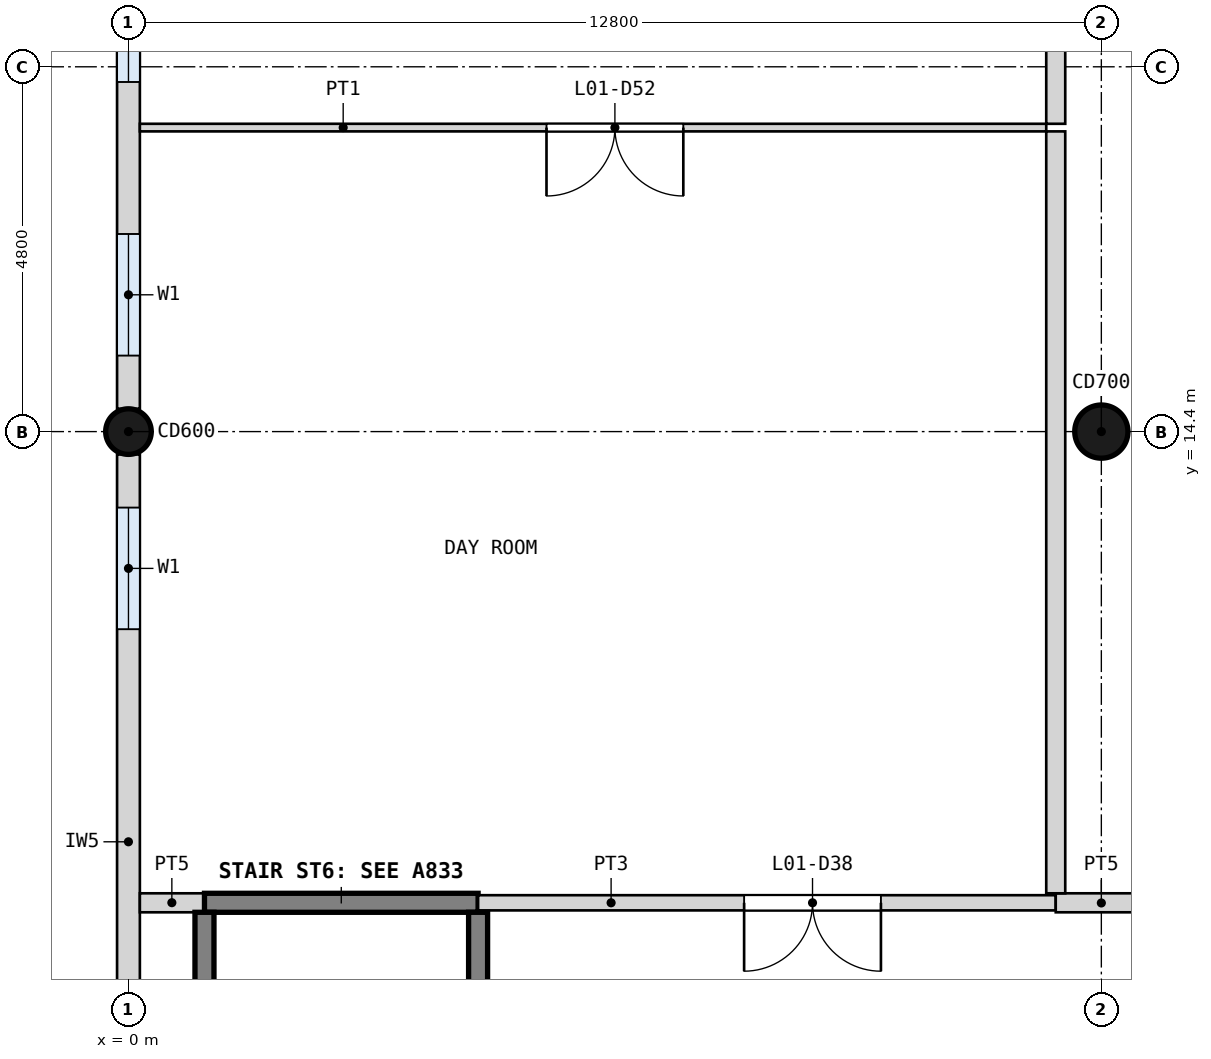
"""IFC4 building model, lengths in metres.
Left out: names, types, materials, properties, quantities, classifications, styles, units other than length and angle.
Written with IfcOpenShell. Run it as: python <this file> out.ifc"""

import sys

from ifc_helpers import new_model, si_unit, direction, frame, frame_2d, origin, origin_2d, place, context, subcontext, project, spatial, rectangle, circle, extrude, element, fill, save


model = new_model("IFC4")
c1 = context("Model", 3, precision=1e-05, world=origin(), true_north=direction((0.0, 1.0)))
c2 = subcontext(c1, "Body", "Model", "MODEL_VIEW")
j1 = project(units=[si_unit("LENGTHUNIT", "METRE"), si_unit("PLANEANGLEUNIT", "RADIAN")], contexts=[c1])
p1 = place(None, origin())
s1 = spatial("IfcSite", under=j1, at=p1, CompositionType="ELEMENT")
p2 = place(p1, origin())
s2 = spatial("IfcBuilding", under=s1, at=p2, CompositionType="ELEMENT")
p3 = place(p2, frame((0.0, 0.0, 4.2)))
s3 = spatial("IfcBuildingStorey", under=s2, at=p3, CompositionType="ELEMENT", Elevation=4.2)
p4 = place(p3, frame((0.0, 14.4, 0.0), z_axis=(0.0, 0.0, 1.0), x_axis=(1.0, 0.0, 0.0)))
e1 = element("IfcColumn", 1, at=p4, inside=s3, PredefinedType="COLUMN", context=c2, shape_type="SweptSolid", body=[
    extrude(circle(Radius=0.3, at=origin_2d()), origin(), (0.0, 0.0, 1.0), 4.2),
])
p5 = place(p3, frame((12.8, 14.4, 0.0), z_axis=(0.0, 0.0, 1.0), x_axis=(1.0, 0.0, 0.0)))
e2 = element("IfcColumn", 2, at=p5, inside=s3, PredefinedType="COLUMN", context=c2, shape_type="SweptSolid", body=[
    extrude(circle(Radius=0.35, at=origin_2d()), origin(), (0.0, 0.0, 1.0), 4.2),
])
p6 = place(p3, frame((0.0, 0.3, 0.0), z_axis=(0.0, 0.0, 1.0), x_axis=(0.0, 1.0, 0.0)))
e3 = element("IfcWall", 3, at=p6, inside=s3, PredefinedType="SOLIDWALL", context=c2, shape_type="SweptSolid", body=[
    extrude(rectangle(XDim=13.8, YDim=0.3, at=frame_2d((6.9, 0.0))), origin(), (0.0, 0.0, 1.0), 2.9),
])
p7 = place(p6, frame((0.7, 0.0, 1.0)))
e4 = element("IfcOpeningElement", 4, at=p7, cuts=e3, PredefinedType="OPENING", context=c2, shape_type="SweptSolid", body=[
    extrude(rectangle(XDim=1.6, YDim=1.8, at=frame_2d((0.8, 0.9))), frame((0.0, 0.16, 0.0), z_axis=(0.0, -1.0, 0.0), x_axis=(1.0, 0.0, 0.0)), (0.0, 0.0, 1.0), 0.32),
])
p8 = place(p6, frame((4.3, 0.0, 1.0)))
e5 = element("IfcOpeningElement", 5, at=p8, cuts=e3, PredefinedType="OPENING", context=c2, shape_type="SweptSolid", body=[
    extrude(rectangle(XDim=1.6, YDim=1.8, at=frame_2d((0.8, 0.9))), frame((0.0, 0.16, 0.0), z_axis=(0.0, -1.0, 0.0), x_axis=(1.0, 0.0, 0.0)), (0.0, 0.0, 1.0), 0.32),
])
p9 = place(p6, frame((11.5, 0.0, 1.0)))
e6 = element("IfcOpeningElement", 6, at=p9, cuts=e3, PredefinedType="OPENING", context=c2, shape_type="SweptSolid", body=[
    extrude(rectangle(XDim=1.6, YDim=1.8, at=frame_2d((0.8, 0.9))), frame((0.0, 0.16, 0.0), z_axis=(0.0, -1.0, 0.0), x_axis=(1.0, 0.0, 0.0)), (0.0, 0.0, 1.0), 0.32),
])
p10 = place(p3, frame((0.0, 14.7, 0.0), z_axis=(0.0, 0.0, 1.0), x_axis=(0.0, 1.0, 0.0)))
e7 = element("IfcWall", 7, at=p10, inside=s3, PredefinedType="SOLIDWALL", context=c2, shape_type="SweptSolid", body=[
    extrude(rectangle(XDim=13.8, YDim=0.3, at=frame_2d((6.9, 0.0))), origin(), (0.0, 0.0, 1.0), 2.9),
])
p11 = place(p10, frame((0.7, 0.0, 1.0)))
e8 = element("IfcOpeningElement", 8, at=p11, cuts=e7, PredefinedType="OPENING", context=c2, shape_type="SweptSolid", body=[
    extrude(rectangle(XDim=1.6, YDim=1.8, at=frame_2d((0.8, 0.9))), frame((0.0, 0.16, 0.0), z_axis=(0.0, -1.0, 0.0), x_axis=(1.0, 0.0, 0.0)), (0.0, 0.0, 1.0), 0.32),
])
p12 = place(p10, frame((4.3, 0.0, 1.0)))
e9 = element("IfcOpeningElement", 9, at=p12, cuts=e7, PredefinedType="OPENING", context=c2, shape_type="SweptSolid", body=[
    extrude(rectangle(XDim=1.6, YDim=1.8, at=frame_2d((0.8, 0.9))), frame((0.0, 0.16, 0.0), z_axis=(0.0, -1.0, 0.0), x_axis=(1.0, 0.0, 0.0)), (0.0, 0.0, 1.0), 0.32),
])
p13 = place(p10, frame((7.9, 0.0, 1.0)))
e10 = element("IfcOpeningElement", 10, at=p13, cuts=e7, PredefinedType="OPENING", context=c2, shape_type="SweptSolid", body=[
    extrude(rectangle(XDim=1.6, YDim=1.8, at=frame_2d((0.8, 0.9))), frame((0.0, 0.16, 0.0), z_axis=(0.0, -1.0, 0.0), x_axis=(1.0, 0.0, 0.0)), (0.0, 0.0, 1.0), 0.32),
])
p14 = place(p10, frame((11.5, 0.0, 1.0)))
e11 = element("IfcOpeningElement", 11, at=p14, cuts=e7, PredefinedType="OPENING", context=c2, shape_type="SweptSolid", body=[
    extrude(rectangle(XDim=1.6, YDim=1.8, at=frame_2d((0.8, 0.9))), frame((0.0, 0.16, 0.0), z_axis=(0.0, -1.0, 0.0), x_axis=(1.0, 0.0, 0.0)), (0.0, 0.0, 1.0), 0.32),
])
p15 = place(p3, frame((0.15, 8.2, 0.0), z_axis=(0.0, 0.0, 1.0), x_axis=(1.0, 0.0, 0.0)))
e12 = element("IfcWall", 12, at=p15, inside=s3, PredefinedType="PARTITIONING", context=c2, shape_type="SweptSolid", body=[
    extrude(rectangle(XDim=0.85, YDim=0.25, at=frame_2d((0.425, 0.0))), origin(), (0.0, 0.0, 1.0), 3.9),
])
p16 = place(p3, frame((1.0, 8.2, 0.0), z_axis=(0.0, 0.0, 1.0), x_axis=(1.0, 0.0, 0.0)))
e13 = element("IfcWall", 13, at=p16, inside=s3, PredefinedType="SHEAR", context=c2, shape_type="SweptSolid", body=[
    extrude(rectangle(XDim=3.6, YDim=0.25, at=frame_2d((1.8, 0.0))), origin(), (0.0, 0.0, 1.0), 3.9),
])
p17 = place(p3, frame((4.6, 8.2, 0.0), z_axis=(0.0, 0.0, 1.0), x_axis=(1.0, 0.0, 0.0)))
e14 = element("IfcWall", 14, at=p17, inside=s3, PredefinedType="PARTITIONING", context=c2, shape_type="SweptSolid", body=[
    extrude(rectangle(XDim=7.6, YDim=0.2, at=frame_2d((3.8, 0.0))), origin(), (0.0, 0.0, 1.0), 3.9),
])
p18 = place(p17, frame((3.5, 0.0, 0.0)))
e15 = element("IfcOpeningElement", 15, at=p18, cuts=e14, PredefinedType="OPENING", context=c2, shape_type="SweptSolid", body=[
    extrude(rectangle(XDim=1.8, YDim=2.1, at=frame_2d((0.9, 1.05))), frame((0.0, 0.11, 0.0), z_axis=(0.0, -1.0, 0.0), x_axis=(1.0, 0.0, 0.0)), (0.0, 0.0, 1.0), 0.22),
])
p19 = place(p3, frame((12.2, 8.2, 0.0), z_axis=(0.0, 0.0, 1.0), x_axis=(1.0, 0.0, 0.0)))
e16 = element("IfcWall", 16, at=p19, inside=s3, PredefinedType="PARTITIONING", context=c2, shape_type="SweptSolid", body=[
    extrude(rectangle(XDim=1.2, YDim=0.25, at=frame_2d((0.6, 0.0))), origin(), (0.0, 0.0, 1.0), 3.9),
])
p20 = place(p3, frame((0.15, 18.4, 0.0), z_axis=(0.0, 0.0, 1.0), x_axis=(1.0, 0.0, 0.0)))
e17 = element("IfcWall", 17, at=p20, inside=s3, PredefinedType="PARTITIONING", context=c2, shape_type="SweptSolid", body=[
    extrude(rectangle(XDim=11.925, YDim=0.1, at=frame_2d((5.962, 0.0))), origin(), (0.0, 0.0, 1.0), 3.9),
])
p21 = place(p20, frame((5.35, 0.0, 0.0)))
e18 = element("IfcOpeningElement", 18, at=p21, cuts=e17, PredefinedType="OPENING", context=c2, shape_type="SweptSolid", body=[
    extrude(rectangle(XDim=1.8, YDim=2.1, at=frame_2d((0.9, 1.05))), frame((0.0, 0.06, 0.0), z_axis=(0.0, -1.0, 0.0), x_axis=(1.0, 0.0, 0.0)), (0.0, 0.0, 1.0), 0.12),
])
p22 = place(p3, frame((1.0, 2.325, 0.0), z_axis=(0.0, 0.0, 1.0), x_axis=(0.0, 1.0, 0.0)))
e19 = element("IfcWall", 19, at=p22, inside=s3, PredefinedType="SHEAR", context=c2, shape_type="SweptSolid", body=[
    extrude(rectangle(XDim=5.75, YDim=0.25, at=frame_2d((2.875, 0.0))), origin(), (0.0, 0.0, 1.0), 3.9),
])
p23 = place(p3, frame((4.6, 5.8, 0.0), z_axis=(0.0, 0.0, 1.0), x_axis=(0.0, 1.0, 0.0)))
e20 = element("IfcWall", 20, at=p23, inside=s3, PredefinedType="SHEAR", context=c2, shape_type="SweptSolid", body=[
    extrude(rectangle(XDim=2.275, YDim=0.25, at=frame_2d((1.137, 0.0))), origin(), (0.0, 0.0, 1.0), 3.9),
])
p24 = place(p3, frame((12.2, 8.325, 0.0), z_axis=(0.0, 0.0, 1.0), x_axis=(0.0, 1.0, 0.0)))
e21 = element("IfcWall", 21, at=p24, inside=s3, PredefinedType="PARTITIONING", context=c2, shape_type="SweptSolid", body=[
    extrude(rectangle(XDim=10.025, YDim=0.25, at=frame_2d((5.013, 0.0))), origin(), (0.0, 0.0, 1.0), 3.9),
])
p25 = place(p3, frame((12.2, 18.45, 0.0), z_axis=(0.0, 0.0, 1.0), x_axis=(0.0, 1.0, 0.0)))
e22 = element("IfcWall", 22, at=p25, inside=s3, PredefinedType="PARTITIONING", context=c2, shape_type="SweptSolid", body=[
    extrude(rectangle(XDim=10.225, YDim=0.25, at=frame_2d((5.113, 0.0))), origin(), (0.0, 0.0, 1.0), 3.9),
])
p26 = place(p18, frame((1.8, 0.0, 0.0), z_axis=(0.0, 0.0, 1.0), x_axis=(-1.0, 0.0, 0.0)))
e23 = element("IfcDoor", 23, at=p26, inside=s3, OperationType="DOUBLE_DOOR_SINGLE_SWING", PredefinedType="DOOR", context=c2, shape_type="SweptSolid", body=[
    extrude(rectangle(XDim=1.8, YDim=2.1, at=frame_2d((0.9, 1.05))), frame((0.0, 0.025, 0.0), z_axis=(0.0, -1.0, 0.0), x_axis=(1.0, 0.0, 0.0)), (0.0, 0.0, 1.0), 0.05),
])
fill(e15, e23)
p27 = place(p21, frame((1.8, 0.0, 0.0), z_axis=(0.0, 0.0, 1.0), x_axis=(-1.0, 0.0, 0.0)))
e24 = element("IfcDoor", 24, at=p27, inside=s3, OperationType="DOUBLE_DOOR_SINGLE_SWING", PredefinedType="DOOR", context=c2, shape_type="SweptSolid", body=[
    extrude(rectangle(XDim=1.8, YDim=2.1, at=frame_2d((0.9, 1.05))), frame((0.0, 0.025, 0.0), z_axis=(0.0, -1.0, 0.0), x_axis=(1.0, 0.0, 0.0)), (0.0, 0.0, 1.0), 0.05),
])
fill(e18, e24)
p28 = place(p9, origin())
e25 = element("IfcWindow", 25, at=p28, inside=s3, PartitioningType="SINGLE_PANEL", PredefinedType="WINDOW", context=c2, shape_type="SweptSolid", body=[
    extrude(rectangle(XDim=1.6, YDim=1.8, at=frame_2d((0.8, 0.9))), frame((0.0, 0.03, 0.0), z_axis=(0.0, -1.0, 0.0), x_axis=(1.0, 0.0, 0.0)), (0.0, 0.0, 1.0), 0.06),
])
fill(e6, e25)
p29 = place(p11, origin())
e26 = element("IfcWindow", 26, at=p29, inside=s3, PartitioningType="SINGLE_PANEL", PredefinedType="WINDOW", context=c2, shape_type="SweptSolid", body=[
    extrude(rectangle(XDim=1.6, YDim=1.8, at=frame_2d((0.8, 0.9))), frame((0.0, 0.03, 0.0), z_axis=(0.0, -1.0, 0.0), x_axis=(1.0, 0.0, 0.0)), (0.0, 0.0, 1.0), 0.06),
])
fill(e8, e26)
p30 = place(p12, origin())
e27 = element("IfcWindow", 27, at=p30, inside=s3, PartitioningType="SINGLE_PANEL", PredefinedType="WINDOW", context=c2, shape_type="SweptSolid", body=[
    extrude(rectangle(XDim=1.6, YDim=1.8, at=frame_2d((0.8, 0.9))), frame((0.0, 0.03, 0.0), z_axis=(0.0, -1.0, 0.0), x_axis=(1.0, 0.0, 0.0)), (0.0, 0.0, 1.0), 0.06),
])
fill(e9, e27)
save(model, sys.argv[1])
